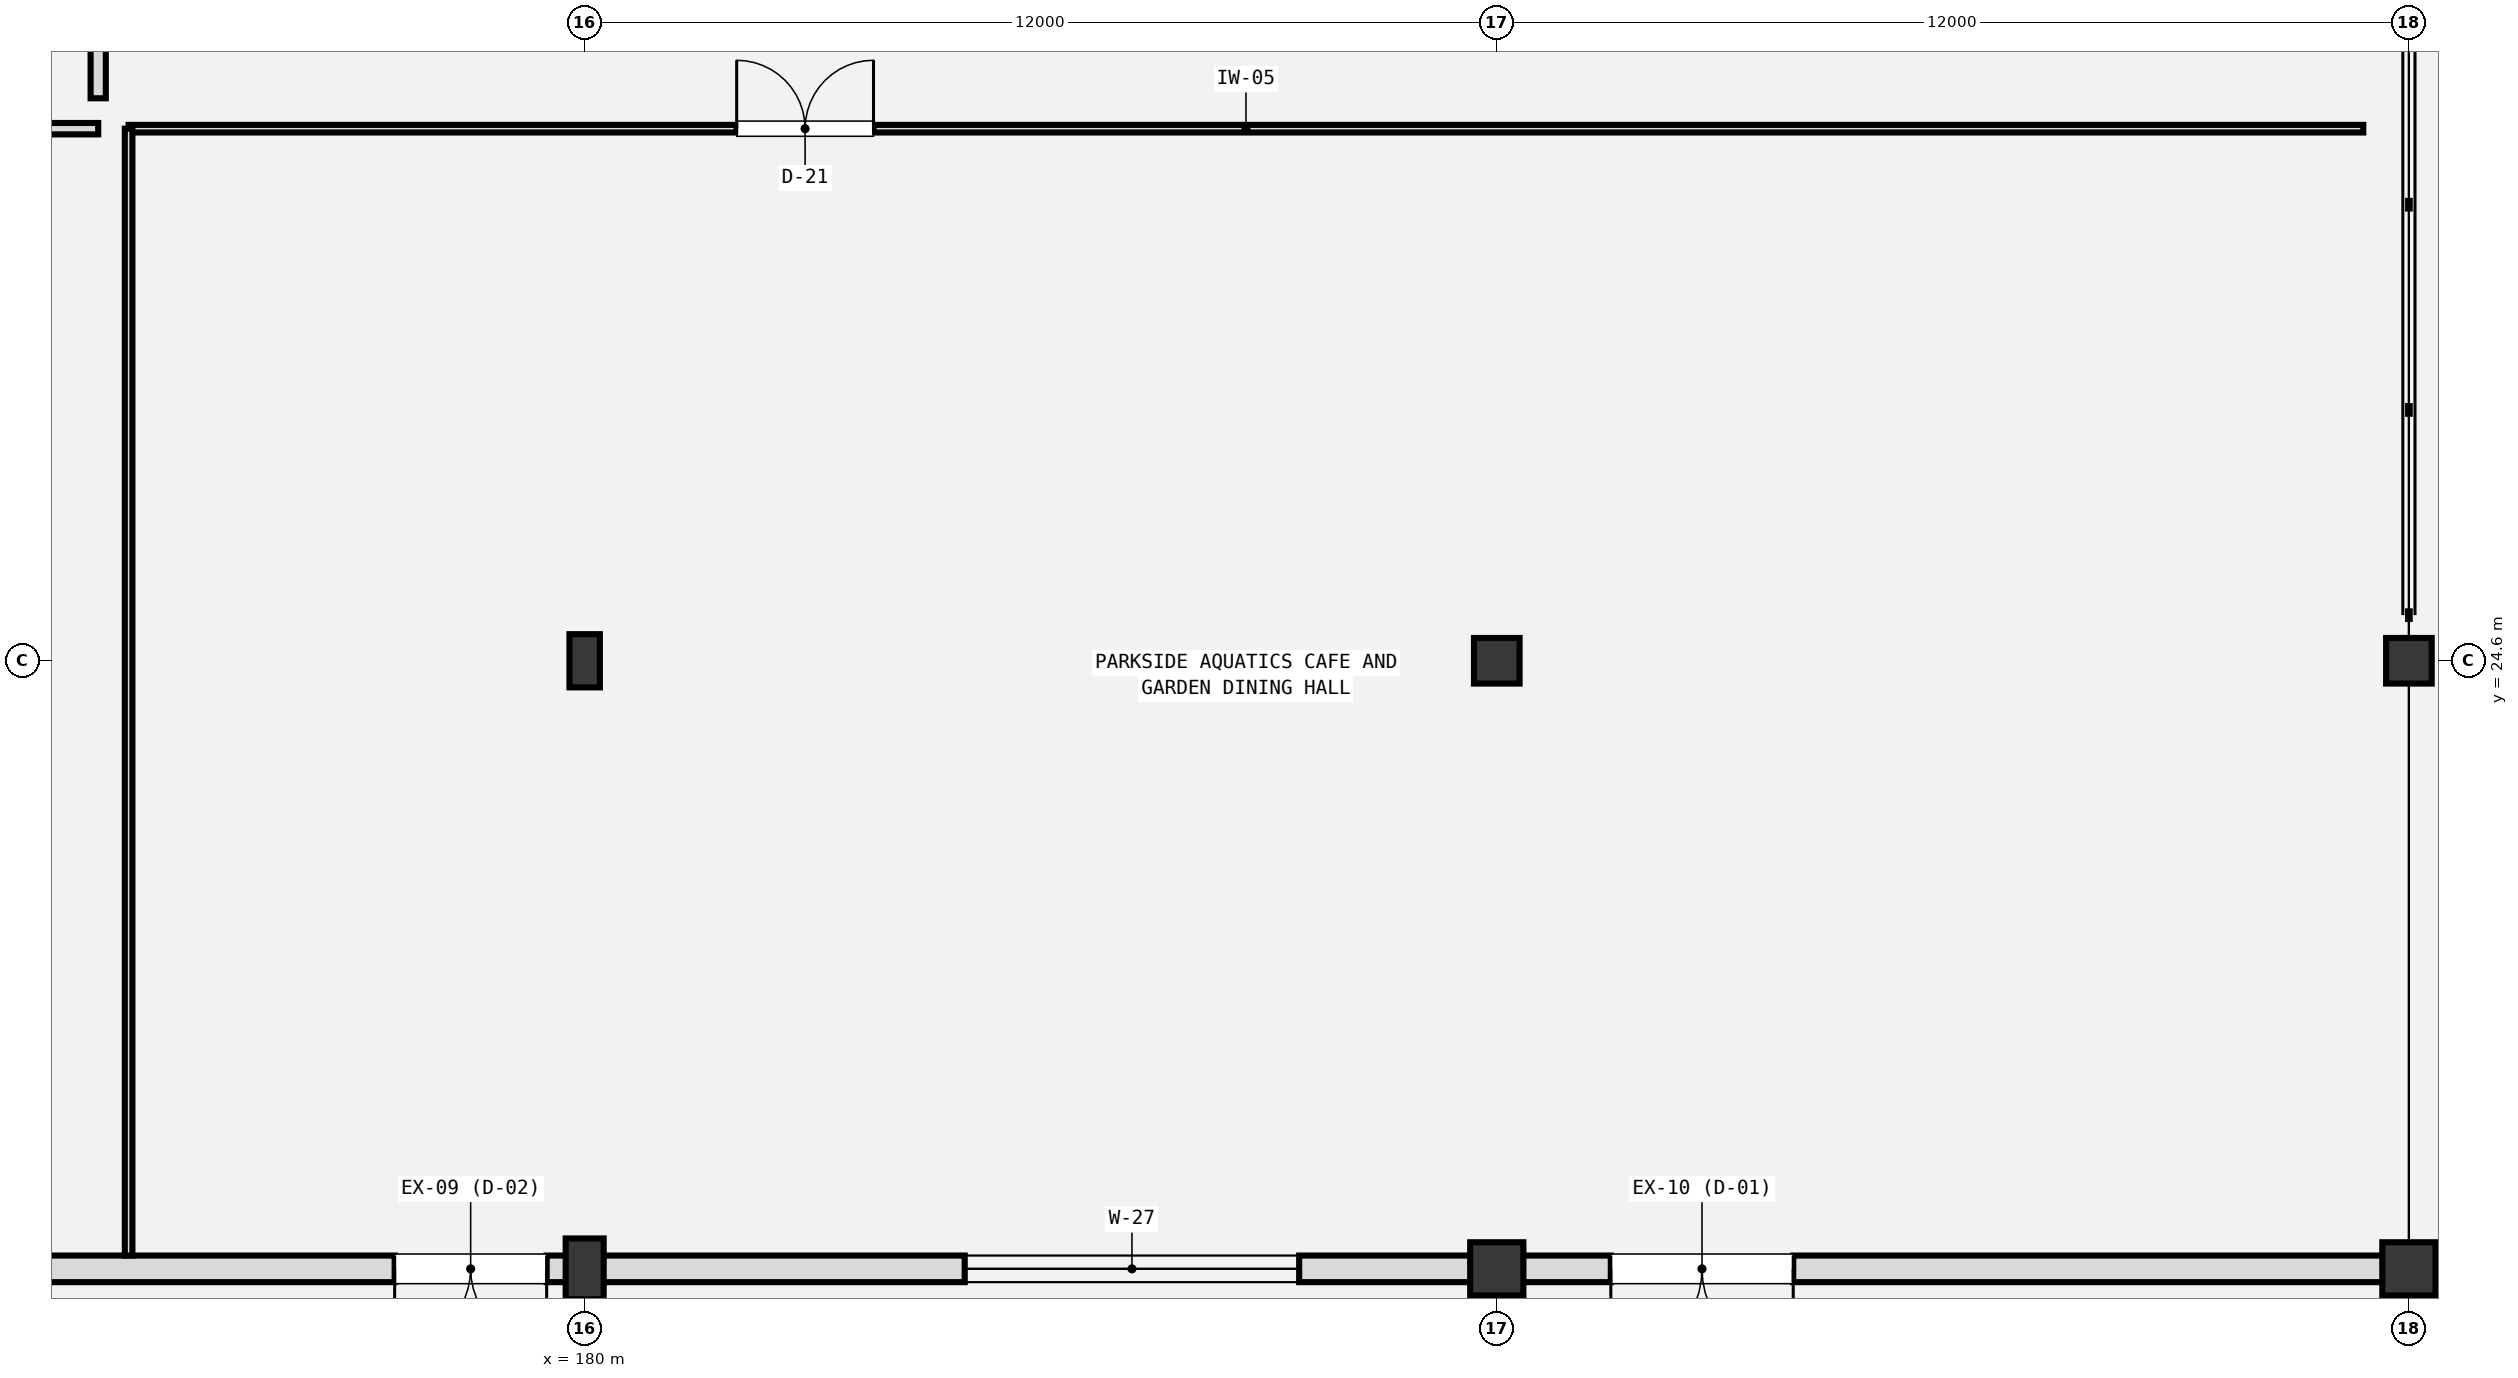
"""IFC4 building model, lengths in metres.
Left out: names, types, materials, properties, quantities, classifications, styles, units other than length and angle.
Written with IfcOpenShell. Run it as: python <this file> out.ifc"""

import sys

from ifc_helpers import new_model, si_unit, direction, frame, frame_2d, origin, origin_2d, place, context, subcontext, project, spatial, rectangle, circle, extrude, element, fill, save


model = new_model("IFC4")
c1 = context("Model", 3, precision=1e-05, world=origin(), true_north=direction((0.0, 1.0)))
c2 = subcontext(c1, "Body", "Model", "MODEL_VIEW")
j1 = project(units=[si_unit("LENGTHUNIT", "METRE"), si_unit("PLANEANGLEUNIT", "RADIAN")], contexts=[c1])
p1 = place(None, origin())
s1 = spatial("IfcSite", under=j1, at=p1, CompositionType="ELEMENT")
p2 = place(p1, origin())
s2 = spatial("IfcBuilding", under=s1, at=p2, CompositionType="ELEMENT")
p3 = place(p2, origin())
s3 = spatial("IfcBuildingStorey", under=s2, at=p3, CompositionType="ELEMENT", Elevation=0.0)
p4 = place(p3, frame((180.0, 16.6, 0.0), z_axis=(0.0, 0.0, 1.0), x_axis=(1.0, 0.0, 0.0)))
e1 = element("IfcColumn", 1, at=p4, inside=s3, PredefinedType="COLUMN", context=c2, shape_type="SweptSolid", body=[
    extrude(rectangle(XDim=0.5, YDim=0.8, at=origin_2d()), origin(), (0.0, 0.0, 1.0), 5.14),
])
p5 = place(p3, frame((180.0, 24.6, 0.0), z_axis=(0.0, 0.0, 1.0), x_axis=(1.0, 0.0, 0.0)))
e2 = element("IfcColumn", 2, at=p5, inside=s3, PredefinedType="PILASTER", context=c2, shape_type="SweptSolid", body=[
    extrude(rectangle(XDim=0.4, YDim=0.7, at=origin_2d()), origin(), (0.0, 0.0, 1.0), 5.4),
])
p6 = place(p3, frame((192.0, 16.6, 0.0), z_axis=(0.0, 0.0, 1.0), x_axis=(1.0, 0.0, 0.0)))
e3 = element("IfcColumn", 3, at=p6, inside=s3, PredefinedType="COLUMN", context=c2, shape_type="SweptSolid", body=[
    extrude(circle(Radius=0.35, at=origin_2d()), origin(), (0.0, 0.0, 1.0), 5.14),
])
p7 = place(p3, frame((192.0, 24.6, 0.0), z_axis=(0.0, 0.0, 1.0), x_axis=(1.0, 0.0, 0.0)))
e4 = element("IfcColumn", 4, at=p7, inside=s3, PredefinedType="COLUMN", context=c2, shape_type="SweptSolid", body=[
    extrude(circle(Radius=0.3, at=origin_2d()), origin(), (0.0, 0.0, 1.0), 5.4),
])
p8 = place(p3, frame((204.0, 16.6, 0.0), z_axis=(0.0, 0.0, 1.0), x_axis=(1.0, 0.0, 0.0)))
e5 = element("IfcColumn", 5, at=p8, inside=s3, PredefinedType="COLUMN", context=c2, shape_type="SweptSolid", body=[
    extrude(circle(Radius=0.35, at=origin_2d()), origin(), (0.0, 0.0, 1.0), 5.14),
])
p9 = place(p3, frame((204.0, 24.6, 0.0), z_axis=(0.0, 0.0, 1.0), x_axis=(1.0, 0.0, 0.0)))
e6 = element("IfcColumn", 6, at=p9, inside=s3, PredefinedType="COLUMN", context=c2, shape_type="SweptSolid", body=[
    extrude(circle(Radius=0.3, at=origin_2d()), origin(), (0.0, 0.0, 1.0), 5.08),
])
p10 = place(p3, frame((162.0, 16.6, 0.0), z_axis=(0.0, 0.0, 1.0), x_axis=(1.0, 0.0, 0.0)))
e7 = element("IfcWall", 7, at=p10, inside=s3, PredefinedType="SOLIDWALL", context=c2, shape_type="SweptSolid", body=[
    extrude(rectangle(XDim=42.0, YDim=0.35, at=frame_2d((21.0, 0.0))), origin(), (0.0, 0.0, 1.0), 5.08),
])
p11 = place(p10, frame((15.5, 0.0, 0.0)))
e8 = element("IfcOpeningElement", 8, at=p11, cuts=e7, PredefinedType="OPENING", context=c2, shape_type="SweptSolid", body=[
    extrude(rectangle(XDim=2.0, YDim=2.4, at=frame_2d((1.0, 1.2))), frame((0.0, 0.185, 0.0), z_axis=(0.0, -1.0, 0.0), x_axis=(1.0, 0.0, 0.0)), (0.0, 0.0, 1.0), 0.37),
])
p12 = place(p10, frame((31.5, 0.0, 0.0)))
e9 = element("IfcOpeningElement", 9, at=p12, cuts=e7, PredefinedType="OPENING", context=c2, shape_type="SweptSolid", body=[
    extrude(rectangle(XDim=2.4, YDim=2.5, at=frame_2d((1.2, 1.25))), frame((0.0, 0.185, 0.0), z_axis=(0.0, -1.0, 0.0), x_axis=(1.0, 0.0, 0.0)), (0.0, 0.0, 1.0), 0.37),
])
p13 = place(p10, frame((2.6, 0.0, 0.85)))
e10 = element("IfcOpeningElement", 10, at=p13, cuts=e7, PredefinedType="OPENING", context=c2, shape_type="SweptSolid", body=[
    extrude(rectangle(XDim=2.8, YDim=1.2, at=frame_2d((1.4, 0.6))), frame((0.0, 0.185, 0.0), z_axis=(0.0, -1.0, 0.0), x_axis=(1.0, 0.0, 0.0)), (0.0, 0.0, 1.0), 0.37),
])
p14 = place(p10, frame((23.0, 0.0, 0.85)))
e11 = element("IfcOpeningElement", 11, at=p14, cuts=e7, PredefinedType="OPENING", context=c2, shape_type="SweptSolid", body=[
    extrude(rectangle(XDim=4.4, YDim=1.4, at=frame_2d((2.2, 0.7))), frame((0.0, 0.185, 0.0), z_axis=(0.0, -1.0, 0.0), x_axis=(1.0, 0.0, 0.0)), (0.0, 0.0, 1.0), 0.37),
])
p15 = place(p3, frame((174.0, 31.6, 0.0), z_axis=(0.0, 0.0, 1.0), x_axis=(1.0, 0.0, 0.0)))
e12 = element("IfcWall", 12, at=p15, inside=s3, PredefinedType="PARTITIONING", context=c2, shape_type="SweptSolid", body=[
    extrude(rectangle(XDim=29.4, YDim=0.1, at=frame_2d((14.7, 0.0))), origin(), (0.0, 0.0, 1.0), 3.9),
])
p16 = place(p15, frame((8.0, 0.0, 0.0)))
e13 = element("IfcOpeningElement", 13, at=p16, cuts=e12, PredefinedType="OPENING", context=c2, shape_type="SweptSolid", body=[
    extrude(rectangle(XDim=1.8, YDim=2.4, at=frame_2d((0.9, 1.2))), frame((0.0, 0.06, 0.0), z_axis=(0.0, -1.0, 0.0), x_axis=(1.0, 0.0, 0.0)), (0.0, 0.0, 1.0), 0.12),
])
p17 = place(p3, frame((174.0, 16.775, 0.0), z_axis=(0.0, 0.0, 1.0), x_axis=(0.0, 1.0, 0.0)))
e14 = element("IfcWall", 14, at=p17, inside=s3, PredefinedType="PARTITIONING", context=c2, shape_type="SweptSolid", body=[
    extrude(rectangle(XDim=14.825, YDim=0.1, at=frame_2d((7.413, 0.0))), origin(), (0.0, 0.0, 1.0), 3.9),
])
p18 = place(p3, frame((162.08, 31.6, 0.0), z_axis=(0.0, 0.0, 1.0), x_axis=(1.0, 0.0, 0.0)))
e15 = element("IfcWall", 15, at=p18, inside=s3, PredefinedType="PARTITIONING", context=c2, shape_type="SweptSolid", body=[
    extrude(rectangle(XDim=11.52, YDim=0.15, at=frame_2d((5.76, 0.0))), origin(), (0.0, 0.0, 1.0), 3.9),
])
p19 = place(p18, frame((4.5, 0.0, 0.0)))
e16 = element("IfcOpeningElement", 16, at=p19, cuts=e15, PredefinedType="OPENING", context=c2, shape_type="SweptSolid", body=[
    extrude(rectangle(XDim=1.0, YDim=2.2, at=frame_2d((0.5, 1.1))), frame((0.0, 0.085, 0.0), z_axis=(0.0, -1.0, 0.0), x_axis=(1.0, 0.0, 0.0)), (0.0, 0.0, 1.0), 0.17),
])
p20 = place(p3, frame((173.6, 32.0, 0.0), z_axis=(0.0, 0.0, 1.0), x_axis=(0.0, 1.0, 0.0)))
e17 = element("IfcWall", 17, at=p20, inside=s3, PredefinedType="SOLIDWALL", context=c2, shape_type="SweptSolid", body=[
    extrude(rectangle(XDim=8.4, YDim=0.2, at=frame_2d((4.2, 0.0))), origin(), (0.0, 0.0, 1.0), 3.9),
])
p21 = place(p20, frame((3.5, 0.0, 0.0)))
e18 = element("IfcOpeningElement", 18, at=p21, cuts=e17, PredefinedType="OPENING", context=c2, shape_type="SweptSolid", body=[
    extrude(rectangle(XDim=1.1, YDim=2.2, at=frame_2d((0.55, 1.1))), frame((0.0, 0.11, 0.0), z_axis=(0.0, -1.0, 0.0), x_axis=(1.0, 0.0, 0.0)), (0.0, 0.0, 1.0), 0.22),
])
p22 = place(p11, frame((2.0, 0.0, 0.0), z_axis=(0.0, 0.0, 1.0), x_axis=(-1.0, 0.0, 0.0)))
e19 = element("IfcDoor", 19, at=p22, inside=s3, OperationType="DOUBLE_DOOR_SINGLE_SWING", PredefinedType="DOOR", context=c2, shape_type="SweptSolid", body=[
    extrude(rectangle(XDim=2.0, YDim=2.4, at=frame_2d((1.0, 1.2))), frame((0.0, 0.025, 0.0), z_axis=(0.0, -1.0, 0.0), x_axis=(1.0, 0.0, 0.0)), (0.0, 0.0, 1.0), 0.05),
])
fill(e8, e19)
p23 = place(p12, frame((2.4, 0.0, 0.0), z_axis=(0.0, 0.0, 1.0), x_axis=(-1.0, 0.0, 0.0)))
e20 = element("IfcDoor", 20, at=p23, inside=s3, OperationType="DOUBLE_DOOR_SINGLE_SWING", PredefinedType="DOOR", context=c2, shape_type="SweptSolid", body=[
    extrude(rectangle(XDim=2.4, YDim=2.5, at=frame_2d((1.2, 1.25))), frame((0.0, 0.025, 0.0), z_axis=(0.0, -1.0, 0.0), x_axis=(1.0, 0.0, 0.0)), (0.0, 0.0, 1.0), 0.05),
])
fill(e9, e20)
p24 = place(p14, frame((4.4, 0.0, 0.0), z_axis=(0.0, 0.0, 1.0), x_axis=(-1.0, 0.0, 0.0)))
e21 = element("IfcWindow", 21, at=p24, inside=s3, PartitioningType="TRIPLE_PANEL_HORIZONTAL", PredefinedType="WINDOW", context=c2, shape_type="SweptSolid", body=[
    extrude(rectangle(XDim=4.4, YDim=1.4, at=frame_2d((2.2, 0.7))), frame((0.0, 0.03, 0.0), z_axis=(0.0, -1.0, 0.0), x_axis=(1.0, 0.0, 0.0)), (0.0, 0.0, 1.0), 0.06),
])
fill(e11, e21)
p25 = place(p16, origin())
e22 = element("IfcDoor", 22, at=p25, inside=s3, OperationType="DOUBLE_DOOR_SINGLE_SWING", PredefinedType="DOOR", context=c2, shape_type="SweptSolid", body=[
    extrude(rectangle(XDim=1.8, YDim=2.4, at=frame_2d((0.9, 1.2))), frame((0.0, 0.025, 0.0), z_axis=(0.0, -1.0, 0.0), x_axis=(1.0, 0.0, 0.0)), (0.0, 0.0, 1.0), 0.05),
])
fill(e13, e22)
save(model, sys.argv[1])
